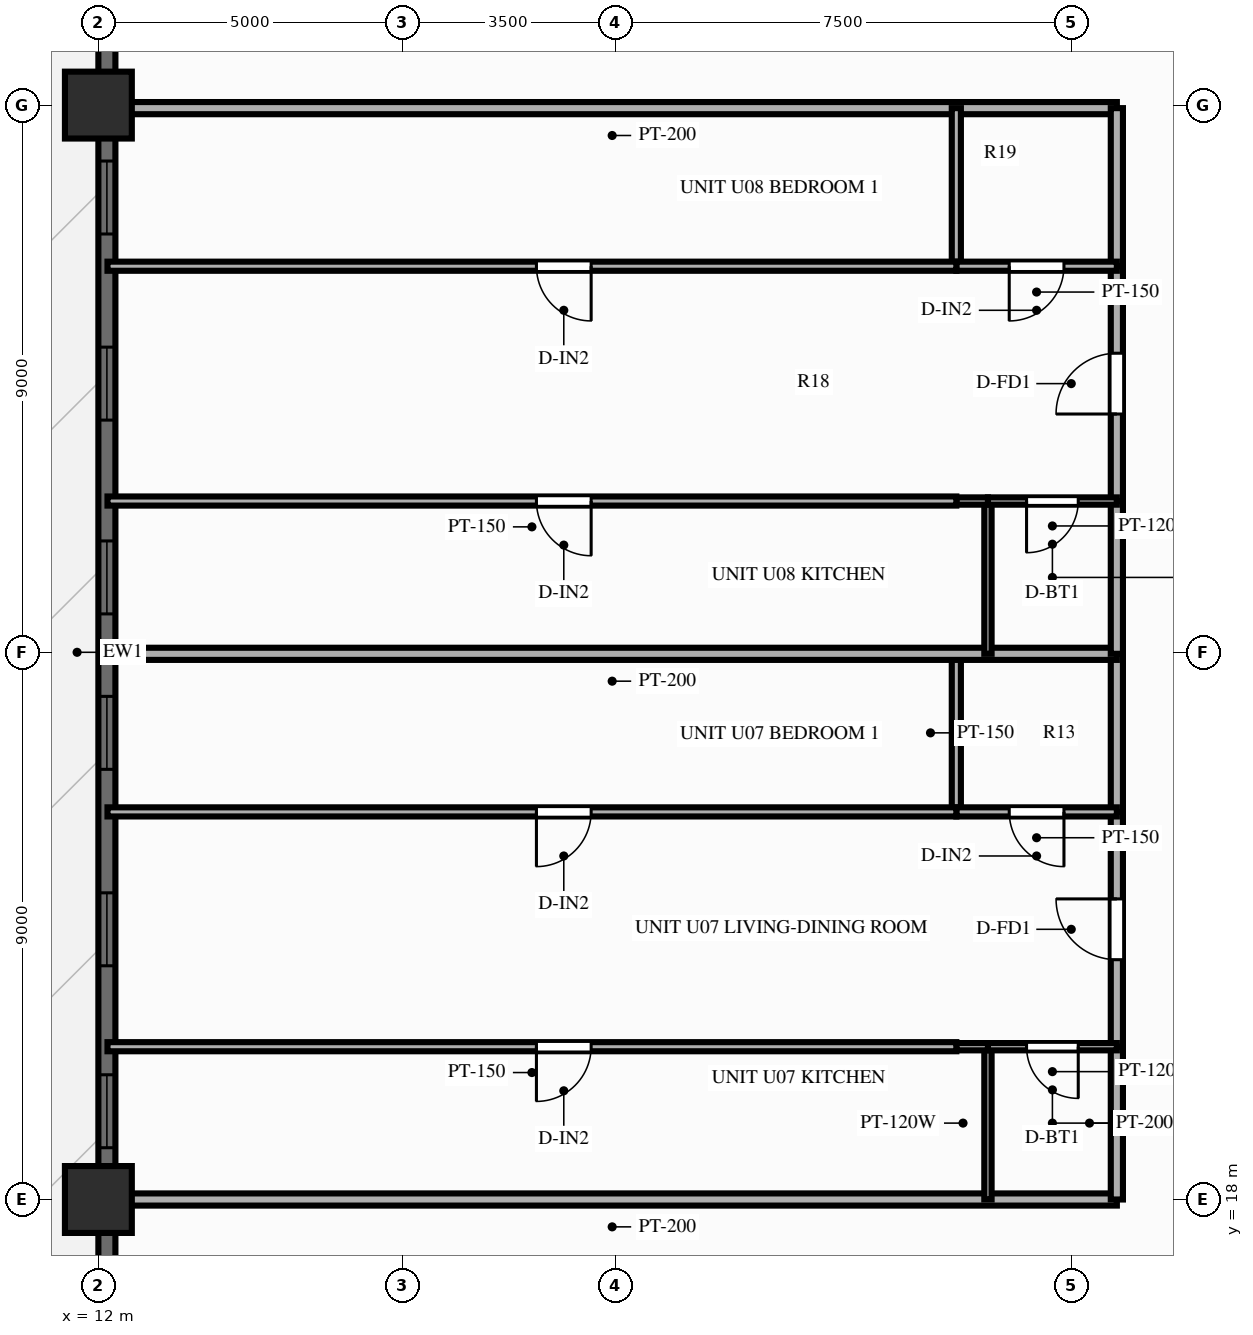
"""IFC4 building model, lengths in metres.
Left out: names, types, materials, properties, quantities, classifications, styles, units other than length and angle.
Written with IfcOpenShell. Run it as: python <this file> out.ifc"""

import sys

from ifc_helpers import new_model, si_unit, direction, frame, frame_2d, origin, origin_2d, place, context, subcontext, project, spatial, rectangle, extrude, source, transform, mapped, element, fill, save


model = new_model("IFC4")
c1 = context("Model", 3, precision=1e-05, world=origin(), true_north=direction((0.0, 1.0)))
c2 = subcontext(c1, "Body", "Model", "MODEL_VIEW")
j1 = project(units=[si_unit("LENGTHUNIT", "METRE"), si_unit("PLANEANGLEUNIT", "RADIAN")], contexts=[c1])
p1 = place(None, origin())
s1 = spatial("IfcSite", under=j1, at=p1, CompositionType="ELEMENT")
p2 = place(p1, origin())
s2 = spatial("IfcBuilding", under=s1, at=p2, CompositionType="ELEMENT")
p3 = place(p2, frame((0.0, 0.0, 49.4)))
s3 = spatial("IfcBuildingStorey", under=s2, at=p3, CompositionType="ELEMENT", Elevation=49.4)
m1 = source(origin(), c2, "Body", "SweptSolid", [
    extrude(rectangle(XDim=1.1, YDim=1.1, at=origin_2d()), origin(), (0.0, 0.0, 1.0), 3.0),
])
for number, where, z_axis, x_axis in (
    (1, (12.0, 36.0, 0.0), (0.0, 0.0, 1.0), (1.0, 0.0, 0.0)),
    (2, (12.0, 18.0, 0.0), (0.0, 0.0, 1.0), (1.0, 0.0, 0.0)),
):
    element("IfcColumn", number, at=place(p3, frame(where, z_axis=z_axis, x_axis=x_axis)), inside=s3, PredefinedType="COLUMN", context=c2, shape_type="MappedRepresentation", body=[
        mapped(m1, transform((0.0, 0.0, 0.0), scale=1.0)),
    ])
p4 = place(p3, frame((12.14, 6.5, 0.0), z_axis=(0.0, 0.0, 1.0), x_axis=(0.0, 1.0, 0.0)))
e3 = element("IfcWall", 3, at=p4, inside=s3, PredefinedType="SOLIDWALL", context=c2, shape_type="SweptSolid", body=[
    extrude(rectangle(XDim=41.0, YDim=0.28, at=frame_2d((20.5, 0.0))), origin(), (0.0, 0.0, 1.0), 2.28),
])
p5 = place(p4, frame((5.15, 0.0, 0.25)))
e4 = element("IfcOpeningElement", 4, at=p5, cuts=e3, PredefinedType="OPENING", context=c2, shape_type="SweptSolid", body=[
    extrude(rectangle(XDim=1.2, YDim=1.5, at=frame_2d((0.6, 0.75))), frame((0.0, 0.152, 0.0), z_axis=(0.0, -1.0, 0.0), x_axis=(1.0, 0.0, 0.0)), (0.0, 0.0, 1.0), 0.304),
])
p6 = place(p4, frame((12.352, 0.0, 0.25)))
e5 = element("IfcOpeningElement", 5, at=p6, cuts=e3, PredefinedType="OPENING", context=c2, shape_type="SweptSolid", body=[
    extrude(rectangle(XDim=1.2, YDim=1.5, at=frame_2d((0.6, 0.75))), frame((0.0, 0.152, 0.0), z_axis=(0.0, -1.0, 0.0), x_axis=(1.0, 0.0, 0.0)), (0.0, 0.0, 1.0), 0.304),
])
p7 = place(p4, frame((15.344, 0.0, 0.25)))
e6 = element("IfcOpeningElement", 6, at=p7, cuts=e3, PredefinedType="OPENING", context=c2, shape_type="SweptSolid", body=[
    extrude(rectangle(XDim=1.2, YDim=1.5, at=frame_2d((0.6, 0.75))), frame((0.0, 0.152, 0.0), z_axis=(0.0, -1.0, 0.0), x_axis=(1.0, 0.0, 0.0)), (0.0, 0.0, 1.0), 0.304),
])
p8 = place(p4, frame((18.575, 0.0, 0.25)))
e7 = element("IfcOpeningElement", 7, at=p8, cuts=e3, PredefinedType="OPENING", context=c2, shape_type="SweptSolid", body=[
    extrude(rectangle(XDim=1.2, YDim=1.5, at=frame_2d((0.6, 0.75))), frame((0.0, 0.152, 0.0), z_axis=(0.0, -1.0, 0.0), x_axis=(1.0, 0.0, 0.0)), (0.0, 0.0, 1.0), 0.304),
])
p9 = place(p4, frame((21.132, 0.0, 0.25)))
e8 = element("IfcOpeningElement", 8, at=p9, cuts=e3, PredefinedType="OPENING", context=c2, shape_type="SweptSolid", body=[
    extrude(rectangle(XDim=1.2, YDim=1.5, at=frame_2d((0.6, 0.75))), frame((0.0, 0.152, 0.0), z_axis=(0.0, -1.0, 0.0), x_axis=(1.0, 0.0, 0.0)), (0.0, 0.0, 1.0), 0.304),
])
p10 = place(p4, frame((24.319, 0.0, 0.25)))
e9 = element("IfcOpeningElement", 9, at=p10, cuts=e3, PredefinedType="OPENING", context=c2, shape_type="SweptSolid", body=[
    extrude(rectangle(XDim=1.2, YDim=1.5, at=frame_2d((0.6, 0.75))), frame((0.0, 0.152, 0.0), z_axis=(0.0, -1.0, 0.0), x_axis=(1.0, 0.0, 0.0)), (0.0, 0.0, 1.0), 0.304),
])
p11 = place(p4, frame((27.38, 0.0, 0.25)))
e10 = element("IfcOpeningElement", 10, at=p11, cuts=e3, PredefinedType="OPENING", context=c2, shape_type="SweptSolid", body=[
    extrude(rectangle(XDim=1.2, YDim=1.5, at=frame_2d((0.6, 0.75))), frame((0.0, 0.152, 0.0), z_axis=(0.0, -1.0, 0.0), x_axis=(1.0, 0.0, 0.0)), (0.0, 0.0, 1.0), 0.304),
])
p12 = place(p4, frame((34.45, 0.0, 0.0)))
e11 = element("IfcOpeningElement", 11, at=p12, cuts=e3, PredefinedType="OPENING", context=c2, shape_type="SweptSolid", body=[
    extrude(rectangle(XDim=1.6, YDim=2.15, at=frame_2d((0.8, 1.075))), frame((0.0, 0.152, 0.0), z_axis=(0.0, -1.0, 0.0), x_axis=(1.0, 0.0, 0.0)), (0.0, 0.0, 1.0), 0.304),
])
for number, where, z_axis, x_axis in (
    (12, (28.75, 18.0, 0.0), (0.0, 0.0, 1.0), (-1.0, 0.0, 0.0)),
    (13, (28.75, 35.95, 0.0), (0.0, 0.0, 1.0), (-1.0, 0.0, 0.0)),
):
    element("IfcWall", number, at=place(p3, frame(where, z_axis=z_axis, x_axis=x_axis)), inside=s3, PredefinedType="PARTITIONING", context=c2, shape_type="SweptSolid", body=[
        extrude(rectangle(XDim=16.6, YDim=0.2, at=frame_2d((8.3, 0.0))), origin(), (0.0, 0.0, 1.0), 2.24),
    ])
p13 = place(p3, frame((28.75, 18.0, 0.0), z_axis=(0.0, 0.0, 1.0), x_axis=(0.0, 1.0, 0.0)))
e14 = element("IfcWall", 14, at=p13, inside=s3, PredefinedType="PARTITIONING", context=c2, shape_type="SweptSolid", body=[
    extrude(rectangle(XDim=2.513, YDim=0.2, at=frame_2d((1.256, 0.0))), origin(), (0.0, 0.0, 1.0), 2.79),
])
p14 = place(p3, frame((28.75, 20.513, 0.0), z_axis=(0.0, 0.0, 1.0), x_axis=(0.0, 1.0, 0.0)))
e15 = element("IfcWall", 15, at=p14, inside=s3, PredefinedType="PARTITIONING", context=c2, shape_type="SweptSolid", body=[
    extrude(rectangle(XDim=3.862, YDim=0.2, at=frame_2d((1.931, 0.0))), origin(), (0.0, 0.0, 1.0), 2.79),
])
p15 = place(p14, frame((1.431, 0.0, 0.0)))
e16 = element("IfcOpeningElement", 16, at=p15, cuts=e15, PredefinedType="OPENING", context=c2, shape_type="SweptSolid", body=[
    extrude(rectangle(XDim=1.0, YDim=2.15, at=frame_2d((0.5, 1.075))), frame((0.0, 0.112, 0.0), z_axis=(0.0, -1.0, 0.0), x_axis=(1.0, 0.0, 0.0)), (0.0, 0.0, 1.0), 0.224),
])
p16 = place(p3, frame((28.75, 24.375, 0.0), z_axis=(0.0, 0.0, 1.0), x_axis=(0.0, 1.0, 0.0)))
e17 = element("IfcWall", 17, at=p16, inside=s3, PredefinedType="PARTITIONING", context=c2, shape_type="SweptSolid", body=[
    extrude(rectangle(XDim=2.6, YDim=0.2, at=frame_2d((1.3, 0.0))), origin(), (0.0, 0.0, 1.0), 2.79),
])
p17 = place(p3, frame((26.63, 18.0, 0.0), z_axis=(0.0, 0.0, 1.0), x_axis=(0.0, 1.0, 0.0)))
e18 = element("IfcWall", 18, at=p17, inside=s3, PredefinedType="PARTITIONING", context=c2, shape_type="SweptSolid", body=[
    extrude(rectangle(XDim=2.513, YDim=0.12, at=frame_2d((1.256, 0.0))), origin(), (0.0, 0.0, 1.0), 2.79),
])
p18 = place(p3, frame((26.11, 24.375, 0.0), z_axis=(0.0, 0.0, 1.0), x_axis=(0.0, 1.0, 0.0)))
e19 = element("IfcWall", 19, at=p18, inside=s3, PredefinedType="PARTITIONING", context=c2, shape_type="SweptSolid", body=[
    extrude(rectangle(XDim=2.6, YDim=0.15, at=frame_2d((1.3, 0.0))), origin(), (0.0, 0.0, 1.0), 2.79),
])
p19 = place(p3, frame((28.75, 20.513, 0.0), z_axis=(0.0, 0.0, 1.0), x_axis=(-1.0, 0.0, 0.0)))
e20 = element("IfcWall", 20, at=p19, inside=s3, PredefinedType="PARTITIONING", context=c2, shape_type="SweptSolid", body=[
    extrude(rectangle(XDim=2.12, YDim=0.12, at=frame_2d((1.06, 0.0))), origin(), (0.0, 0.0, 1.0), 2.79),
])
p20 = place(p19, frame((0.635, 0.0, 0.0)))
e21 = element("IfcOpeningElement", 21, at=p20, cuts=e20, PredefinedType="OPENING", context=c2, shape_type="SweptSolid", body=[
    extrude(rectangle(XDim=0.85, YDim=2.05, at=frame_2d((0.425, 1.025))), frame((0.0, 0.072, 0.0), z_axis=(0.0, -1.0, 0.0), x_axis=(1.0, 0.0, 0.0)), (0.0, 0.0, 1.0), 0.144),
])
p21 = place(p3, frame((26.63, 20.513, 0.0), z_axis=(0.0, 0.0, 1.0), x_axis=(-1.0, 0.0, 0.0)))
e22 = element("IfcWall", 22, at=p21, inside=s3, PredefinedType="PARTITIONING", context=c2, shape_type="SweptSolid", body=[
    extrude(rectangle(XDim=0.52, YDim=0.12, at=frame_2d((0.26, 0.0))), origin(), (0.0, 0.0, 1.0), 2.79),
])
p22 = place(p3, frame((26.11, 20.513, 0.0), z_axis=(0.0, 0.0, 1.0), x_axis=(-1.0, 0.0, 0.0)))
e23 = element("IfcWall", 23, at=p22, inside=s3, PredefinedType="PARTITIONING", context=c2, shape_type="SweptSolid", body=[
    extrude(rectangle(XDim=13.96, YDim=0.15, at=frame_2d((6.98, 0.0))), origin(), (0.0, 0.0, 1.0), 2.79),
])
p23 = place(p22, frame((6.006, 0.0, 0.0)))
e24 = element("IfcOpeningElement", 24, at=p23, cuts=e23, PredefinedType="OPENING", context=c2, shape_type="SweptSolid", body=[
    extrude(rectangle(XDim=0.9, YDim=2.1, at=frame_2d((0.45, 1.05))), frame((0.0, 0.087, 0.0), z_axis=(0.0, -1.0, 0.0), x_axis=(1.0, 0.0, 0.0)), (0.0, 0.0, 1.0), 0.174),
])
p24 = place(p3, frame((28.75, 24.375, 0.0), z_axis=(0.0, 0.0, 1.0), x_axis=(-1.0, 0.0, 0.0)))
e25 = element("IfcWall", 25, at=p24, inside=s3, PredefinedType="PARTITIONING", context=c2, shape_type="SweptSolid", body=[
    extrude(rectangle(XDim=2.64, YDim=0.15, at=frame_2d((1.32, 0.0))), origin(), (0.0, 0.0, 1.0), 2.79),
])
p25 = place(p24, frame((0.87, 0.0, 0.0)))
e26 = element("IfcOpeningElement", 26, at=p25, cuts=e25, PredefinedType="OPENING", context=c2, shape_type="SweptSolid", body=[
    extrude(rectangle(XDim=0.9, YDim=2.1, at=frame_2d((0.45, 1.05))), frame((0.0, 0.087, 0.0), z_axis=(0.0, -1.0, 0.0), x_axis=(1.0, 0.0, 0.0)), (0.0, 0.0, 1.0), 0.174),
])
p26 = place(p3, frame((26.11, 24.375, 0.0), z_axis=(0.0, 0.0, 1.0), x_axis=(-1.0, 0.0, 0.0)))
e27 = element("IfcWall", 27, at=p26, inside=s3, PredefinedType="PARTITIONING", context=c2, shape_type="SweptSolid", body=[
    extrude(rectangle(XDim=13.96, YDim=0.15, at=frame_2d((6.98, 0.0))), origin(), (0.0, 0.0, 1.0), 2.79),
])
p27 = place(p26, frame((6.006, 0.0, 0.0)))
e28 = element("IfcOpeningElement", 28, at=p27, cuts=e27, PredefinedType="OPENING", context=c2, shape_type="SweptSolid", body=[
    extrude(rectangle(XDim=0.9, YDim=2.1, at=frame_2d((0.45, 1.05))), frame((0.0, 0.087, 0.0), z_axis=(0.0, -1.0, 0.0), x_axis=(1.0, 0.0, 0.0)), (0.0, 0.0, 1.0), 0.174),
])
p28 = place(p3, frame((28.75, 26.975, 0.0), z_axis=(0.0, 0.0, 1.0), x_axis=(-1.0, 0.0, 0.0)))
e29 = element("IfcWall", 29, at=p28, inside=s3, PredefinedType="PARTITIONING", context=c2, shape_type="SweptSolid", body=[
    extrude(rectangle(XDim=16.6, YDim=0.2, at=frame_2d((8.3, 0.0))), origin(), (0.0, 0.0, 1.0), 2.79),
])
p29 = place(p3, frame((28.75, 26.975, 0.0), z_axis=(0.0, 0.0, 1.0), x_axis=(0.0, 1.0, 0.0)))
e30 = element("IfcWall", 30, at=p29, inside=s3, PredefinedType="PARTITIONING", context=c2, shape_type="SweptSolid", body=[
    extrude(rectangle(XDim=2.513, YDim=0.2, at=frame_2d((1.256, 0.0))), origin(), (0.0, 0.0, 1.0), 2.79),
])
p30 = place(p3, frame((28.75, 29.488, 0.0), z_axis=(0.0, 0.0, 1.0), x_axis=(0.0, 1.0, 0.0)))
e31 = element("IfcWall", 31, at=p30, inside=s3, PredefinedType="PARTITIONING", context=c2, shape_type="SweptSolid", body=[
    extrude(rectangle(XDim=3.862, YDim=0.2, at=frame_2d((1.931, 0.0))), origin(), (0.0, 0.0, 1.0), 2.79),
])
p31 = place(p30, frame((1.431, 0.0, 0.0)))
e32 = element("IfcOpeningElement", 32, at=p31, cuts=e31, PredefinedType="OPENING", context=c2, shape_type="SweptSolid", body=[
    extrude(rectangle(XDim=1.0, YDim=2.15, at=frame_2d((0.5, 1.075))), frame((0.0, 0.112, 0.0), z_axis=(0.0, -1.0, 0.0), x_axis=(1.0, 0.0, 0.0)), (0.0, 0.0, 1.0), 0.224),
])
p32 = place(p3, frame((28.75, 33.35, 0.0), z_axis=(0.0, 0.0, 1.0), x_axis=(0.0, 1.0, 0.0)))
e33 = element("IfcWall", 33, at=p32, inside=s3, PredefinedType="PARTITIONING", context=c2, shape_type="SweptSolid", body=[
    extrude(rectangle(XDim=2.6, YDim=0.2, at=frame_2d((1.3, 0.0))), origin(), (0.0, 0.0, 1.0), 2.79),
])
p33 = place(p3, frame((26.63, 26.975, 0.0), z_axis=(0.0, 0.0, 1.0), x_axis=(0.0, 1.0, 0.0)))
e34 = element("IfcWall", 34, at=p33, inside=s3, PredefinedType="PARTITIONING", context=c2, shape_type="SweptSolid", body=[
    extrude(rectangle(XDim=2.513, YDim=0.12, at=frame_2d((1.256, 0.0))), origin(), (0.0, 0.0, 1.0), 2.79),
])
p34 = place(p3, frame((26.11, 33.35, 0.0), z_axis=(0.0, 0.0, 1.0), x_axis=(0.0, 1.0, 0.0)))
e35 = element("IfcWall", 35, at=p34, inside=s3, PredefinedType="PARTITIONING", context=c2, shape_type="SweptSolid", body=[
    extrude(rectangle(XDim=2.6, YDim=0.15, at=frame_2d((1.3, 0.0))), origin(), (0.0, 0.0, 1.0), 2.79),
])
p35 = place(p3, frame((28.75, 29.488, 0.0), z_axis=(0.0, 0.0, 1.0), x_axis=(-1.0, 0.0, 0.0)))
e36 = element("IfcWall", 36, at=p35, inside=s3, PredefinedType="PARTITIONING", context=c2, shape_type="SweptSolid", body=[
    extrude(rectangle(XDim=2.12, YDim=0.12, at=frame_2d((1.06, 0.0))), origin(), (0.0, 0.0, 1.0), 2.79),
])
p36 = place(p35, frame((0.635, 0.0, 0.0)))
e37 = element("IfcOpeningElement", 37, at=p36, cuts=e36, PredefinedType="OPENING", context=c2, shape_type="SweptSolid", body=[
    extrude(rectangle(XDim=0.85, YDim=2.05, at=frame_2d((0.425, 1.025))), frame((0.0, 0.072, 0.0), z_axis=(0.0, -1.0, 0.0), x_axis=(1.0, 0.0, 0.0)), (0.0, 0.0, 1.0), 0.144),
])
p37 = place(p3, frame((26.63, 29.488, 0.0), z_axis=(0.0, 0.0, 1.0), x_axis=(-1.0, 0.0, 0.0)))
e38 = element("IfcWall", 38, at=p37, inside=s3, PredefinedType="PARTITIONING", context=c2, shape_type="SweptSolid", body=[
    extrude(rectangle(XDim=0.52, YDim=0.12, at=frame_2d((0.26, 0.0))), origin(), (0.0, 0.0, 1.0), 2.79),
])
p38 = place(p3, frame((26.11, 29.488, 0.0), z_axis=(0.0, 0.0, 1.0), x_axis=(-1.0, 0.0, 0.0)))
e39 = element("IfcWall", 39, at=p38, inside=s3, PredefinedType="PARTITIONING", context=c2, shape_type="SweptSolid", body=[
    extrude(rectangle(XDim=13.96, YDim=0.15, at=frame_2d((6.98, 0.0))), origin(), (0.0, 0.0, 1.0), 2.79),
])
p39 = place(p38, frame((6.006, 0.0, 0.0)))
e40 = element("IfcOpeningElement", 40, at=p39, cuts=e39, PredefinedType="OPENING", context=c2, shape_type="SweptSolid", body=[
    extrude(rectangle(XDim=0.9, YDim=2.1, at=frame_2d((0.45, 1.05))), frame((0.0, 0.087, 0.0), z_axis=(0.0, -1.0, 0.0), x_axis=(1.0, 0.0, 0.0)), (0.0, 0.0, 1.0), 0.174),
])
p40 = place(p3, frame((28.75, 33.35, 0.0), z_axis=(0.0, 0.0, 1.0), x_axis=(-1.0, 0.0, 0.0)))
e41 = element("IfcWall", 41, at=p40, inside=s3, PredefinedType="PARTITIONING", context=c2, shape_type="SweptSolid", body=[
    extrude(rectangle(XDim=2.64, YDim=0.15, at=frame_2d((1.32, 0.0))), origin(), (0.0, 0.0, 1.0), 2.79),
])
p41 = place(p40, frame((0.87, 0.0, 0.0)))
e42 = element("IfcOpeningElement", 42, at=p41, cuts=e41, PredefinedType="OPENING", context=c2, shape_type="SweptSolid", body=[
    extrude(rectangle(XDim=0.9, YDim=2.1, at=frame_2d((0.45, 1.05))), frame((0.0, 0.087, 0.0), z_axis=(0.0, -1.0, 0.0), x_axis=(1.0, 0.0, 0.0)), (0.0, 0.0, 1.0), 0.174),
])
p42 = place(p3, frame((26.11, 33.35, 0.0), z_axis=(0.0, 0.0, 1.0), x_axis=(-1.0, 0.0, 0.0)))
e43 = element("IfcWall", 43, at=p42, inside=s3, PredefinedType="PARTITIONING", context=c2, shape_type="SweptSolid", body=[
    extrude(rectangle(XDim=13.96, YDim=0.15, at=frame_2d((6.98, 0.0))), origin(), (0.0, 0.0, 1.0), 2.79),
])
p43 = place(p42, frame((6.006, 0.0, 0.0)))
e44 = element("IfcOpeningElement", 44, at=p43, cuts=e43, PredefinedType="OPENING", context=c2, shape_type="SweptSolid", body=[
    extrude(rectangle(XDim=0.9, YDim=2.1, at=frame_2d((0.45, 1.05))), frame((0.0, 0.087, 0.0), z_axis=(0.0, -1.0, 0.0), x_axis=(1.0, 0.0, 0.0)), (0.0, 0.0, 1.0), 0.174),
])
m2 = source(origin(), c2, "Body", "SweptSolid", [
    extrude(rectangle(XDim=1.2, YDim=1.5, at=frame_2d((0.6, 0.75))), frame((0.0, 0.03, 0.0), z_axis=(0.0, -1.0, 0.0), x_axis=(1.0, 0.0, 0.0)), (0.0, 0.0, 1.0), 0.06),
])
p44 = place(p6, origin())
e45 = element("IfcWindow", 45, at=p44, inside=s3, PartitioningType="SINGLE_PANEL", PredefinedType="WINDOW", context=c2, shape_type="MappedRepresentation", body=[
    mapped(m2, transform((0.0, 0.0, 0.0), scale=1.0)),
])
fill(e5, e45)
p45 = place(p7, origin())
e46 = element("IfcWindow", 46, at=p45, inside=s3, PartitioningType="SINGLE_PANEL", PredefinedType="WINDOW", context=c2, shape_type="MappedRepresentation", body=[
    mapped(m2, transform((0.0, 0.0, 0.0), scale=1.0)),
])
fill(e6, e46)
p46 = place(p8, origin())
e47 = element("IfcWindow", 47, at=p46, inside=s3, PartitioningType="SINGLE_PANEL", PredefinedType="WINDOW", context=c2, shape_type="MappedRepresentation", body=[
    mapped(m2, transform((0.0, 0.0, 0.0), scale=1.0)),
])
fill(e7, e47)
p47 = place(p9, origin())
e48 = element("IfcWindow", 48, at=p47, inside=s3, PartitioningType="SINGLE_PANEL", PredefinedType="WINDOW", context=c2, shape_type="MappedRepresentation", body=[
    mapped(m2, transform((0.0, 0.0, 0.0), scale=1.0)),
])
fill(e8, e48)
p48 = place(p10, origin())
e49 = element("IfcWindow", 49, at=p48, inside=s3, PartitioningType="SINGLE_PANEL", PredefinedType="WINDOW", context=c2, shape_type="MappedRepresentation", body=[
    mapped(m2, transform((0.0, 0.0, 0.0), scale=1.0)),
])
fill(e9, e49)
p49 = place(p11, origin())
e50 = element("IfcWindow", 50, at=p49, inside=s3, PartitioningType="SINGLE_PANEL", PredefinedType="WINDOW", context=c2, shape_type="MappedRepresentation", body=[
    mapped(m2, transform((0.0, 0.0, 0.0), scale=1.0)),
])
fill(e10, e50)
m3 = source(origin(), c2, "Body", "SweptSolid", [
    extrude(rectangle(XDim=1.0, YDim=2.15, at=frame_2d((0.5, 1.075))), frame((0.0, 0.025, 0.0), z_axis=(0.0, -1.0, 0.0), x_axis=(1.0, 0.0, 0.0)), (0.0, 0.0, 1.0), 0.05),
])
p50 = place(p15, origin())
e51 = element("IfcDoor", 51, at=p50, inside=s3, OperationType="SINGLE_SWING_RIGHT", PredefinedType="DOOR", context=c2, shape_type="MappedRepresentation", body=[
    mapped(m3, transform((0.0, 0.0, 0.0), scale=1.0)),
])
fill(e16, e51)
m4 = source(origin(), c2, "Body", "SweptSolid", [
    extrude(rectangle(XDim=0.85, YDim=2.05, at=frame_2d((0.425, 1.025))), frame((0.0, 0.025, 0.0), z_axis=(0.0, -1.0, 0.0), x_axis=(1.0, 0.0, 0.0)), (0.0, 0.0, 1.0), 0.05),
])
p51 = place(p20, origin())
e52 = element("IfcDoor", 52, at=p51, inside=s3, OperationType="SINGLE_SWING_LEFT", PredefinedType="DOOR", context=c2, shape_type="MappedRepresentation", body=[
    mapped(m4, transform((0.0, 0.0, 0.0), scale=1.0)),
])
fill(e21, e52)
m5 = source(origin(), c2, "Body", "SweptSolid", [
    extrude(rectangle(XDim=0.9, YDim=2.1, at=frame_2d((0.45, 1.05))), frame((0.0, 0.025, 0.0), z_axis=(0.0, -1.0, 0.0), x_axis=(1.0, 0.0, 0.0)), (0.0, 0.0, 1.0), 0.05),
])
p52 = place(p23, origin())
e53 = element("IfcDoor", 53, at=p52, inside=s3, OperationType="SINGLE_SWING_RIGHT", PredefinedType="DOOR", context=c2, shape_type="MappedRepresentation", body=[
    mapped(m5, transform((0.0, 0.0, 0.0), scale=1.0)),
])
fill(e24, e53)
p53 = place(p25, origin())
e54 = element("IfcDoor", 54, at=p53, inside=s3, OperationType="SINGLE_SWING_LEFT", PredefinedType="DOOR", context=c2, shape_type="MappedRepresentation", body=[
    mapped(m5, transform((0.0, 0.0, 0.0), scale=1.0)),
])
fill(e26, e54)
p54 = place(p27, origin())
e55 = element("IfcDoor", 55, at=p54, inside=s3, OperationType="SINGLE_SWING_RIGHT", PredefinedType="DOOR", context=c2, shape_type="MappedRepresentation", body=[
    mapped(m5, transform((0.0, 0.0, 0.0), scale=1.0)),
])
fill(e28, e55)
p55 = place(p31, origin())
e56 = element("IfcDoor", 56, at=p55, inside=s3, OperationType="SINGLE_SWING_LEFT", PredefinedType="DOOR", context=c2, shape_type="MappedRepresentation", body=[
    mapped(m3, transform((0.0, 0.0, 0.0), scale=1.0)),
])
fill(e32, e56)
p56 = place(p36, origin())
e57 = element("IfcDoor", 57, at=p56, inside=s3, OperationType="SINGLE_SWING_RIGHT", PredefinedType="DOOR", context=c2, shape_type="MappedRepresentation", body=[
    mapped(m4, transform((0.0, 0.0, 0.0), scale=1.0)),
])
fill(e37, e57)
p57 = place(p39, origin())
e58 = element("IfcDoor", 58, at=p57, inside=s3, OperationType="SINGLE_SWING_LEFT", PredefinedType="DOOR", context=c2, shape_type="MappedRepresentation", body=[
    mapped(m5, transform((0.0, 0.0, 0.0), scale=1.0)),
])
fill(e40, e58)
p58 = place(p41, origin())
e59 = element("IfcDoor", 59, at=p58, inside=s3, OperationType="SINGLE_SWING_RIGHT", PredefinedType="DOOR", context=c2, shape_type="MappedRepresentation", body=[
    mapped(m5, transform((0.0, 0.0, 0.0), scale=1.0)),
])
fill(e42, e59)
p59 = place(p43, origin())
e60 = element("IfcDoor", 60, at=p59, inside=s3, OperationType="SINGLE_SWING_LEFT", PredefinedType="DOOR", context=c2, shape_type="MappedRepresentation", body=[
    mapped(m5, transform((0.0, 0.0, 0.0), scale=1.0)),
])
fill(e44, e60)
save(model, sys.argv[1])
